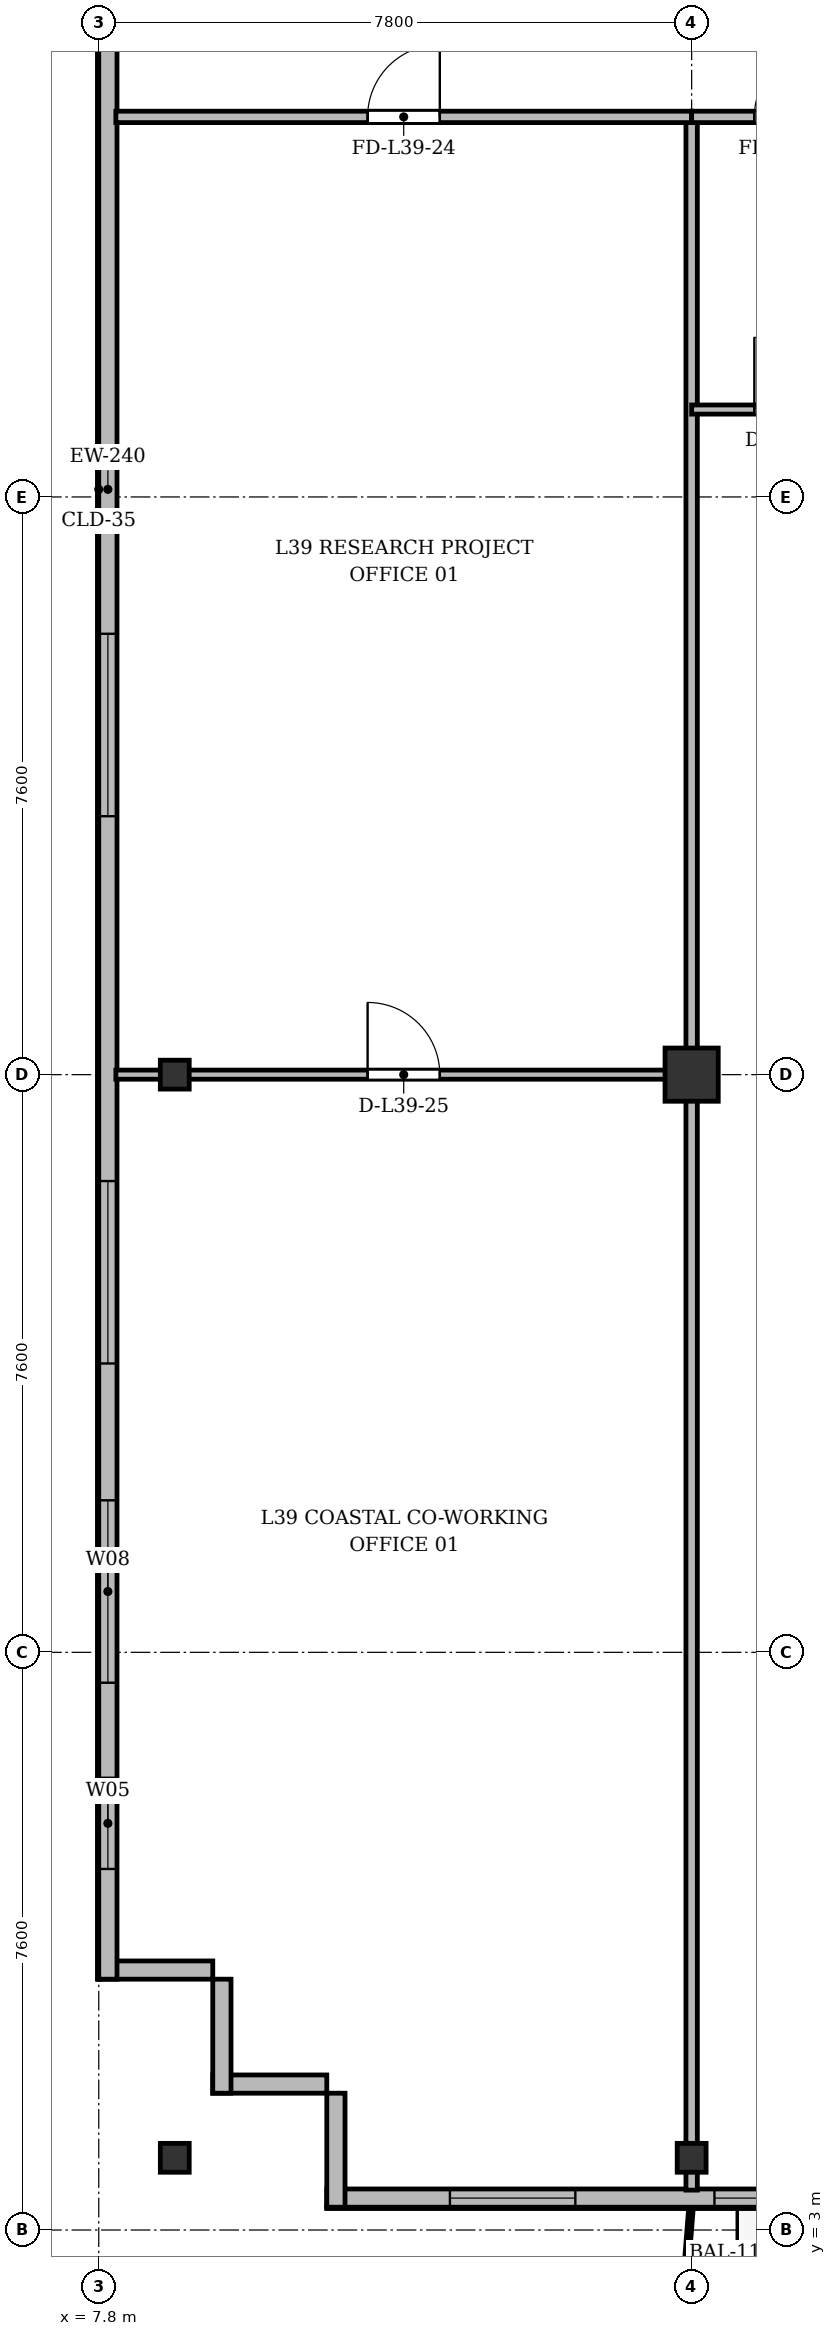
"""IFC4 building model, lengths in metres.
Left out: names, types, materials, properties, quantities, classifications, styles, units other than length and angle.
Written with IfcOpenShell. Run it as: python <this file> out.ifc"""

import sys

from ifc_helpers import new_model, si_unit, direction, frame, frame_2d, origin, origin_2d, place, context, subcontext, project, spatial, rectangle, i_section, extrude, source, transform, mapped, element, fill, save


model = new_model("IFC4")
c1 = context("Model", 3, precision=1e-05, world=origin(), true_north=direction((0.0, 1.0)))
c2 = subcontext(c1, "Body", "Model", "MODEL_VIEW")
j1 = project(units=[si_unit("LENGTHUNIT", "METRE"), si_unit("PLANEANGLEUNIT", "RADIAN")], contexts=[c1])
p1 = place(None, origin())
s1 = spatial("IfcSite", under=j1, at=p1, CompositionType="ELEMENT")
p2 = place(p1, origin())
s2 = spatial("IfcBuilding", under=s1, at=p2, CompositionType="ELEMENT")
p3 = place(p2, frame((0.0, 0.0, 150.1)))
s3 = spatial("IfcBuildingStorey", under=s2, at=p3, CompositionType="ELEMENT", Elevation=150.1)
m1 = source(origin(), c2, "Body", "SweptSolid", [
    extrude(i_section(OverallWidth=0.38, OverallDepth=0.38, WebThickness=0.02, FlangeThickness=0.03, at=origin_2d()), origin(), (0.0, 0.0, 1.0), 3.6),
])
for number, where, z_axis, x_axis in (
    (1, (8.8, 3.95, 0.0), (0.0, 0.0, 1.0), (1.0, 0.0, 0.0)),
    (2, (8.8, 18.2, 0.0), (0.0, 0.0, 1.0), (1.0, 0.0, 0.0)),
    (3, (15.6, 3.95, 0.0), (0.0, 0.0, 1.0), (1.0, 0.0, 0.0)),
):
    element("IfcColumn", number, at=place(p3, frame(where, z_axis=z_axis, x_axis=x_axis)), inside=s3, PredefinedType="COLUMN", context=c2, shape_type="MappedRepresentation", body=[
        mapped(m1, transform((0.0, 0.0, 0.0), x_axis=(1.0, 0.0, 0.0), y_axis=(0.0, 1.0, 0.0), z_axis=(0.0, 0.0, 1.0), scale=1.0)),
    ])
m2 = source(origin(), c2, "Body", "SweptSolid", [
    extrude(rectangle(XDim=0.7, YDim=0.7, at=origin_2d()), origin(), (0.0, 0.0, 1.0), 3.6),
])
p4 = place(p3, frame((15.6, 18.2, 0.0), z_axis=(0.0, 0.0, 1.0), x_axis=(1.0, 0.0, 0.0)))
e4 = element("IfcColumn", 4, at=p4, inside=s3, PredefinedType="COLUMN", context=c2, shape_type="MappedRepresentation", body=[
    mapped(m2, transform((0.0, 0.0, 0.0), x_axis=(1.0, 0.0, 0.0), y_axis=(0.0, 1.0, 0.0), z_axis=(0.0, 0.0, 1.0), scale=1.0)),
])
for number, where, z_axis, x_axis in (
    (5, (10.8, 4.92, 0.0), (0.0, 0.0, 1.0), (-1.0, 0.0, 0.0)),
    (6, (9.42, 4.8, 0.0), (0.0, 0.0, 1.0), (0.0, 1.0, 0.0)),
):
    element("IfcWall", number, at=place(p3, frame(where, z_axis=z_axis, x_axis=x_axis)), inside=s3, PredefinedType="SOLIDWALL", context=c2, shape_type="SweptSolid", body=[
        extrude(rectangle(XDim=1.5, YDim=0.24, at=frame_2d((0.75, 0.0))), origin(), (0.0, 0.0, 1.0), 3.35),
    ])
p5 = place(p3, frame((9.3, 6.42, 0.0), z_axis=(0.0, 0.0, 1.0), x_axis=(-1.0, 0.0, 0.0)))
e7 = element("IfcWall", 7, at=p5, inside=s3, PredefinedType="SOLIDWALL", context=c2, shape_type="SweptSolid", body=[
    extrude(rectangle(XDim=1.5, YDim=0.24, at=frame_2d((0.75, 0.0))), origin(), (0.0, 0.0, 1.0), 2.85),
])
p6 = place(p3, frame((7.92, 6.3, 0.0), z_axis=(0.0, 0.0, 1.0), x_axis=(0.0, 1.0, 0.0)))
e8 = element("IfcWall", 8, at=p6, inside=s3, PredefinedType="SOLIDWALL", context=c2, shape_type="SweptSolid", body=[
    extrude(rectangle(XDim=39.2, YDim=0.24, at=frame_2d((19.6, 0.0))), origin(), (0.0, 0.0, 1.0), 3.35),
])
p7 = place(p6, frame((1.45, 0.0, 0.92)))
e9 = element("IfcOpeningElement", 9, at=p7, cuts=e8, PredefinedType="OPENING", context=c2, shape_type="SweptSolid", body=[
    extrude(rectangle(XDim=1.2, YDim=1.65, at=frame_2d((0.6, 0.825))), frame((0.0, 0.13, 0.0), z_axis=(0.0, -1.0, 0.0), x_axis=(1.0, 0.0, 0.0)), (0.0, 0.0, 1.0), 0.26),
])
p8 = place(p6, frame((3.9, 0.0, 0.92)))
e10 = element("IfcOpeningElement", 10, at=p8, cuts=e8, PredefinedType="OPENING", context=c2, shape_type="SweptSolid", body=[
    extrude(rectangle(XDim=2.4, YDim=2.1, at=frame_2d((1.2, 1.05))), frame((0.0, 0.13, 0.0), z_axis=(0.0, -1.0, 0.0), x_axis=(1.0, 0.0, 0.0)), (0.0, 0.0, 1.0), 0.26),
])
p9 = place(p6, frame((8.1, 0.0, 0.92)))
e11 = element("IfcOpeningElement", 11, at=p9, cuts=e8, PredefinedType="OPENING", context=c2, shape_type="SweptSolid", body=[
    extrude(rectangle(XDim=2.4, YDim=2.1, at=frame_2d((1.2, 1.05))), frame((0.0, 0.13, 0.0), z_axis=(0.0, -1.0, 0.0), x_axis=(1.0, 0.0, 0.0)), (0.0, 0.0, 1.0), 0.26),
])
p10 = place(p6, frame((15.3, 0.0, 0.92)))
e12 = element("IfcOpeningElement", 12, at=p10, cuts=e8, PredefinedType="OPENING", context=c2, shape_type="SweptSolid", body=[
    extrude(rectangle(XDim=2.4, YDim=2.1, at=frame_2d((1.2, 1.05))), frame((0.0, 0.13, 0.0), z_axis=(0.0, -1.0, 0.0), x_axis=(1.0, 0.0, 0.0)), (0.0, 0.0, 1.0), 0.26),
])
p11 = place(p6, frame((29.3, 0.0, 0.92)))
e13 = element("IfcOpeningElement", 13, at=p11, cuts=e8, PredefinedType="OPENING", context=c2, shape_type="SweptSolid", body=[
    extrude(rectangle(XDim=2.4, YDim=2.1, at=frame_2d((1.2, 1.05))), frame((0.0, 0.13, 0.0), z_axis=(0.0, -1.0, 0.0), x_axis=(1.0, 0.0, 0.0)), (0.0, 0.0, 1.0), 0.26),
])
p12 = place(p6, frame((33.5, 0.0, 0.92)))
e14 = element("IfcOpeningElement", 14, at=p12, cuts=e8, PredefinedType="OPENING", context=c2, shape_type="SweptSolid", body=[
    extrude(rectangle(XDim=1.2, YDim=1.65, at=frame_2d((0.6, 0.825))), frame((0.0, 0.13, 0.0), z_axis=(0.0, -1.0, 0.0), x_axis=(1.0, 0.0, 0.0)), (0.0, 0.0, 1.0), 0.26),
])
p13 = place(p6, frame((36.85, 0.0, 0.92)))
e15 = element("IfcOpeningElement", 15, at=p13, cuts=e8, PredefinedType="OPENING", context=c2, shape_type="SweptSolid", body=[
    extrude(rectangle(XDim=1.2, YDim=1.65, at=frame_2d((0.6, 0.825))), frame((0.0, 0.13, 0.0), z_axis=(0.0, -1.0, 0.0), x_axis=(1.0, 0.0, 0.0)), (0.0, 0.0, 1.0), 0.26),
])
p14 = place(p3, frame((63.6, 3.42, 0.0), z_axis=(0.0, 0.0, 1.0), x_axis=(-1.0, 0.0, 0.0)))
e16 = element("IfcWall", 16, at=p14, inside=s3, PredefinedType="SOLIDWALL", context=c2, shape_type="SweptSolid", body=[
    extrude(rectangle(XDim=52.8, YDim=0.24, at=frame_2d((26.4, 0.0))), origin(), (0.0, 0.0, 1.0), 3.35),
])
p15 = place(p14, frame((1.62, 0.0, 0.9)))
e17 = element("IfcOpeningElement", 17, at=p15, cuts=e16, PredefinedType="OPENING", context=c2, shape_type="SweptSolid", body=[
    extrude(rectangle(XDim=1.65, YDim=1.85, at=frame_2d((0.825, 0.925))), frame((0.0, 0.13, 0.0), z_axis=(0.0, -1.0, 0.0), x_axis=(1.0, 0.0, 0.0)), (0.0, 0.0, 1.0), 0.26),
])
p16 = place(p14, frame((5.2, 0.0, 0.9)))
e18 = element("IfcOpeningElement", 18, at=p16, cuts=e16, PredefinedType="OPENING", context=c2, shape_type="SweptSolid", body=[
    extrude(rectangle(XDim=1.8, YDim=1.8, at=frame_2d((0.9, 0.9))), frame((0.0, 0.13, 0.0), z_axis=(0.0, -1.0, 0.0), x_axis=(1.0, 0.0, 0.0)), (0.0, 0.0, 1.0), 0.26),
])
p17 = place(p14, frame((7.65, 0.0, 0.9)))
e19 = element("IfcOpeningElement", 19, at=p17, cuts=e16, PredefinedType="OPENING", context=c2, shape_type="SweptSolid", body=[
    extrude(rectangle(XDim=1.5, YDim=1.75, at=frame_2d((0.75, 0.875))), frame((0.0, 0.13, 0.0), z_axis=(0.0, -1.0, 0.0), x_axis=(1.0, 0.0, 0.0)), (0.0, 0.0, 1.0), 0.26),
])
p18 = place(p14, frame((10.25, 0.0, 0.9)))
e20 = element("IfcOpeningElement", 20, at=p18, cuts=e16, PredefinedType="OPENING", context=c2, shape_type="SweptSolid", body=[
    extrude(rectangle(XDim=1.5, YDim=1.75, at=frame_2d((0.75, 0.875))), frame((0.0, 0.13, 0.0), z_axis=(0.0, -1.0, 0.0), x_axis=(1.0, 0.0, 0.0)), (0.0, 0.0, 1.0), 0.26),
])
p19 = place(p14, frame((14.417, 0.0, 0.0)))
e21 = element("IfcOpeningElement", 21, at=p19, cuts=e16, PredefinedType="OPENING", context=c2, shape_type="SweptSolid", body=[
    extrude(rectangle(XDim=1.2, YDim=2.2, at=frame_2d((0.6, 1.1))), frame((0.0, 0.13, 0.0), z_axis=(0.0, -1.0, 0.0), x_axis=(1.0, 0.0, 0.0)), (0.0, 0.0, 1.0), 0.26),
])
p20 = place(p14, frame((25.575, 0.0, 0.9)))
e22 = element("IfcOpeningElement", 22, at=p20, cuts=e16, PredefinedType="OPENING", context=c2, shape_type="SweptSolid", body=[
    extrude(rectangle(XDim=1.65, YDim=1.85, at=frame_2d((0.825, 0.925))), frame((0.0, 0.13, 0.0), z_axis=(0.0, -1.0, 0.0), x_axis=(1.0, 0.0, 0.0)), (0.0, 0.0, 1.0), 0.26),
])
p21 = place(p14, frame((35.7, 0.0, 0.9)))
e23 = element("IfcOpeningElement", 23, at=p21, cuts=e16, PredefinedType="OPENING", context=c2, shape_type="SweptSolid", body=[
    extrude(rectangle(XDim=1.8, YDim=1.8, at=frame_2d((0.9, 0.9))), frame((0.0, 0.13, 0.0), z_axis=(0.0, -1.0, 0.0), x_axis=(1.0, 0.0, 0.0)), (0.0, 0.0, 1.0), 0.26),
])
p22 = place(p14, frame((41.656, 0.0, 0.0)))
e24 = element("IfcOpeningElement", 24, at=p22, cuts=e16, PredefinedType="OPENING", context=c2, shape_type="SweptSolid", body=[
    extrude(rectangle(XDim=1.2, YDim=2.2, at=frame_2d((0.6, 1.1))), frame((0.0, 0.13, 0.0), z_axis=(0.0, -1.0, 0.0), x_axis=(1.0, 0.0, 0.0)), (0.0, 0.0, 1.0), 0.26),
])
p23 = place(p14, frame((43.65, 0.0, 0.9)))
e25 = element("IfcOpeningElement", 25, at=p23, cuts=e16, PredefinedType="OPENING", context=c2, shape_type="SweptSolid", body=[
    extrude(rectangle(XDim=1.5, YDim=1.75, at=frame_2d((0.75, 0.875))), frame((0.0, 0.13, 0.0), z_axis=(0.0, -1.0, 0.0), x_axis=(1.0, 0.0, 0.0)), (0.0, 0.0, 1.0), 0.26),
])
p24 = place(p14, frame((45.7, 0.0, 0.9)))
e26 = element("IfcOpeningElement", 26, at=p24, cuts=e16, PredefinedType="OPENING", context=c2, shape_type="SweptSolid", body=[
    extrude(rectangle(XDim=2.0, YDim=1.95, at=frame_2d((1.0, 0.975))), frame((0.0, 0.13, 0.0), z_axis=(0.0, -1.0, 0.0), x_axis=(1.0, 0.0, 0.0)), (0.0, 0.0, 1.0), 0.26),
])
p25 = place(p14, frame((49.53, 0.0, 0.9)))
e27 = element("IfcOpeningElement", 27, at=p25, cuts=e16, PredefinedType="OPENING", context=c2, shape_type="SweptSolid", body=[
    extrude(rectangle(XDim=1.65, YDim=1.85, at=frame_2d((0.825, 0.925))), frame((0.0, 0.13, 0.0), z_axis=(0.0, -1.0, 0.0), x_axis=(1.0, 0.0, 0.0)), (0.0, 0.0, 1.0), 0.26),
])
p26 = place(p3, frame((10.92, 3.3, 0.0), z_axis=(0.0, 0.0, 1.0), x_axis=(0.0, 1.0, 0.0)))
e28 = element("IfcWall", 28, at=p26, inside=s3, PredefinedType="SOLIDWALL", context=c2, shape_type="SweptSolid", body=[
    extrude(rectangle(XDim=1.5, YDim=0.24, at=frame_2d((0.75, 0.0))), origin(), (0.0, 0.0, 1.0), 2.75),
])
p27 = place(p3, frame((15.6, 3.525, 0.0), z_axis=(0.0, 0.0, 1.0), x_axis=(0.0, 1.0, 0.0)))
e29 = element("IfcWall", 29, at=p27, inside=s3, PredefinedType="PARTITIONING", context=c2, shape_type="SweptSolid", body=[
    extrude(rectangle(XDim=27.275, YDim=0.15, at=frame_2d((13.638, 0.0))), origin(), (0.0, 0.0, 1.0), 2.85),
])
p28 = place(p3, frame((8.025, 30.8, 0.0), z_axis=(0.0, 0.0, 1.0), x_axis=(1.0, 0.0, 0.0)))
e30 = element("IfcWall", 30, at=p28, inside=s3, PredefinedType="PARTITIONING", context=c2, shape_type="SweptSolid", body=[
    extrude(rectangle(XDim=7.575, YDim=0.15, at=frame_2d((3.788, 0.0))), origin(), (0.0, 0.0, 1.0), 2.85),
])
p29 = place(p28, frame((3.312, 0.0, 0.0)))
e31 = element("IfcOpeningElement", 31, at=p29, cuts=e30, PredefinedType="OPENING", context=c2, shape_type="SweptSolid", body=[
    extrude(rectangle(XDim=0.95, YDim=2.15, at=frame_2d((0.475, 1.075))), frame((0.0, 0.085, 0.0), z_axis=(0.0, -1.0, 0.0), x_axis=(1.0, 0.0, 0.0)), (0.0, 0.0, 1.0), 0.17),
])
p30 = place(p3, frame((8.025, 18.2, 0.0), z_axis=(0.0, 0.0, 1.0), x_axis=(1.0, 0.0, 0.0)))
e32 = element("IfcWall", 32, at=p30, inside=s3, PredefinedType="PARTITIONING", context=c2, shape_type="SweptSolid", body=[
    extrude(rectangle(XDim=7.575, YDim=0.12, at=frame_2d((3.788, 0.0))), origin(), (0.0, 0.0, 1.0), 2.75),
])
p31 = place(p30, frame((3.312, 0.0, 0.0)))
e33 = element("IfcOpeningElement", 33, at=p31, cuts=e32, PredefinedType="OPENING", context=c2, shape_type="SweptSolid", body=[
    extrude(rectangle(XDim=0.95, YDim=2.15, at=frame_2d((0.475, 1.075))), frame((0.0, 0.07, 0.0), z_axis=(0.0, -1.0, 0.0), x_axis=(1.0, 0.0, 0.0)), (0.0, 0.0, 1.0), 0.14),
])
p32 = place(p3, frame((15.6, 30.8, 0.0), z_axis=(0.0, 0.0, 1.0), x_axis=(1.0, 0.0, 0.0)))
e34 = element("IfcWall", 34, at=p32, inside=s3, PredefinedType="PARTITIONING", context=c2, shape_type="SweptSolid", body=[
    extrude(rectangle(XDim=2.6, YDim=0.15, at=frame_2d((1.3, 0.0))), origin(), (0.0, 0.0, 1.0), 2.85),
])
p33 = place(p32, frame((0.825, 0.0, 0.0)))
e35 = element("IfcOpeningElement", 35, at=p33, cuts=e34, PredefinedType="OPENING", context=c2, shape_type="SweptSolid", body=[
    extrude(rectangle(XDim=0.95, YDim=2.15, at=frame_2d((0.475, 1.075))), frame((0.0, 0.085, 0.0), z_axis=(0.0, -1.0, 0.0), x_axis=(1.0, 0.0, 0.0)), (0.0, 0.0, 1.0), 0.17),
])
p34 = place(p3, frame((15.6, 26.95, 0.0), z_axis=(0.0, 0.0, 1.0), x_axis=(1.0, 0.0, 0.0)))
e36 = element("IfcWall", 36, at=p34, inside=s3, PredefinedType="PARTITIONING", context=c2, shape_type="SweptSolid", body=[
    extrude(rectangle(XDim=2.6, YDim=0.12, at=frame_2d((1.3, 0.0))), origin(), (0.0, 0.0, 1.0), 2.85),
])
p35 = place(p34, frame((0.825, 0.0, 0.0)))
e37 = element("IfcOpeningElement", 37, at=p35, cuts=e36, PredefinedType="OPENING", context=c2, shape_type="SweptSolid", body=[
    extrude(rectangle(XDim=0.95, YDim=2.15, at=frame_2d((0.475, 1.075))), frame((0.0, 0.07, 0.0), z_axis=(0.0, -1.0, 0.0), x_axis=(1.0, 0.0, 0.0)), (0.0, 0.0, 1.0), 0.14),
])
m3 = source(origin(), c2, "Body", "SweptSolid", [
    extrude(rectangle(XDim=1.2, YDim=1.65, at=frame_2d((0.6, 0.825))), frame((0.0, 0.03, 0.0), z_axis=(0.0, -1.0, 0.0), x_axis=(1.0, 0.0, 0.0)), (0.0, 0.0, 1.0), 0.06),
])
p36 = place(p7, origin())
e38 = element("IfcWindow", 38, at=p36, inside=s3, PartitioningType="SINGLE_PANEL", PredefinedType="WINDOW", context=c2, shape_type="MappedRepresentation", body=[
    mapped(m3, transform((0.0, 0.0, 0.0), x_axis=(1.0, 0.0, 0.0), y_axis=(0.0, 1.0, 0.0), z_axis=(0.0, 0.0, 1.0), scale=1.0)),
])
fill(e9, e38)
m4 = source(origin(), c2, "Body", "SweptSolid", [
    extrude(rectangle(XDim=2.4, YDim=2.1, at=frame_2d((1.2, 1.05))), frame((0.0, 0.03, 0.0), z_axis=(0.0, -1.0, 0.0), x_axis=(1.0, 0.0, 0.0)), (0.0, 0.0, 1.0), 0.06),
])
p37 = place(p8, origin())
e39 = element("IfcWindow", 39, at=p37, inside=s3, PartitioningType="SINGLE_PANEL", PredefinedType="WINDOW", context=c2, shape_type="MappedRepresentation", body=[
    mapped(m4, transform((0.0, 0.0, 0.0), x_axis=(1.0, 0.0, 0.0), y_axis=(0.0, 1.0, 0.0), z_axis=(0.0, 0.0, 1.0), scale=1.0)),
])
fill(e10, e39)
p38 = place(p9, origin())
e40 = element("IfcWindow", 40, at=p38, inside=s3, PartitioningType="SINGLE_PANEL", PredefinedType="WINDOW", context=c2, shape_type="MappedRepresentation", body=[
    mapped(m4, transform((0.0, 0.0, 0.0), x_axis=(1.0, 0.0, 0.0), y_axis=(0.0, 1.0, 0.0), z_axis=(0.0, 0.0, 1.0), scale=1.0)),
])
fill(e11, e40)
p39 = place(p10, origin())
e41 = element("IfcWindow", 41, at=p39, inside=s3, PartitioningType="SINGLE_PANEL", PredefinedType="WINDOW", context=c2, shape_type="MappedRepresentation", body=[
    mapped(m4, transform((0.0, 0.0, 0.0), x_axis=(1.0, 0.0, 0.0), y_axis=(0.0, 1.0, 0.0), z_axis=(0.0, 0.0, 1.0), scale=1.0)),
])
fill(e12, e41)
m5 = source(origin(), c2, "Body", "SweptSolid", [
    extrude(rectangle(XDim=2.0, YDim=1.95, at=frame_2d((1.0, 0.975))), frame((0.0, 0.03, 0.0), z_axis=(0.0, -1.0, 0.0), x_axis=(1.0, 0.0, 0.0)), (0.0, 0.0, 1.0), 0.06),
])
p40 = place(p24, origin())
e42 = element("IfcWindow", 42, at=p40, inside=s3, PartitioningType="SINGLE_PANEL", PredefinedType="WINDOW", context=c2, shape_type="MappedRepresentation", body=[
    mapped(m5, transform((0.0, 0.0, 0.0), x_axis=(1.0, 0.0, 0.0), y_axis=(0.0, 1.0, 0.0), z_axis=(0.0, 0.0, 1.0), scale=1.0)),
])
fill(e26, e42)
m6 = source(origin(), c2, "Body", "SweptSolid", [
    extrude(rectangle(XDim=1.65, YDim=1.85, at=frame_2d((0.825, 0.925))), frame((0.0, 0.03, 0.0), z_axis=(0.0, -1.0, 0.0), x_axis=(1.0, 0.0, 0.0)), (0.0, 0.0, 1.0), 0.06),
])
p41 = place(p25, origin())
e43 = element("IfcWindow", 43, at=p41, inside=s3, PartitioningType="SINGLE_PANEL", PredefinedType="WINDOW", context=c2, shape_type="MappedRepresentation", body=[
    mapped(m6, transform((0.0, 0.0, 0.0), x_axis=(1.0, 0.0, 0.0), y_axis=(0.0, 1.0, 0.0), z_axis=(0.0, 0.0, 1.0), scale=1.0)),
])
fill(e27, e43)
m7 = source(origin(), c2, "Body", "SweptSolid", [
    extrude(rectangle(XDim=0.95, YDim=2.15, at=frame_2d((0.475, 1.075))), frame((0.0, 0.025, 0.0), z_axis=(0.0, -1.0, 0.0), x_axis=(1.0, 0.0, 0.0)), (0.0, 0.0, 1.0), 0.05),
])
p42 = place(p29, origin())
e44 = element("IfcDoor", 44, at=p42, inside=s3, OperationType="SINGLE_SWING_RIGHT", PredefinedType="DOOR", context=c2, shape_type="MappedRepresentation", body=[
    mapped(m7, transform((0.0, 0.0, 0.0), x_axis=(1.0, 0.0, 0.0), y_axis=(0.0, 1.0, 0.0), z_axis=(0.0, 0.0, 1.0), scale=1.0)),
])
fill(e31, e44)
p43 = place(p31, origin())
e45 = element("IfcDoor", 45, at=p43, inside=s3, OperationType="SINGLE_SWING_LEFT", PredefinedType="DOOR", context=c2, shape_type="MappedRepresentation", body=[
    mapped(m7, transform((0.0, 0.0, 0.0), x_axis=(1.0, 0.0, 0.0), y_axis=(0.0, 1.0, 0.0), z_axis=(0.0, 0.0, 1.0), scale=1.0)),
])
fill(e33, e45)
p44 = place(p33, origin())
e46 = element("IfcDoor", 46, at=p44, inside=s3, OperationType="SINGLE_SWING_RIGHT", PredefinedType="DOOR", context=c2, shape_type="MappedRepresentation", body=[
    mapped(m7, transform((0.0, 0.0, 0.0), x_axis=(1.0, 0.0, 0.0), y_axis=(0.0, 1.0, 0.0), z_axis=(0.0, 0.0, 1.0), scale=1.0)),
])
fill(e35, e46)
p45 = place(p35, origin())
e47 = element("IfcDoor", 47, at=p45, inside=s3, OperationType="SINGLE_SWING_LEFT", PredefinedType="DOOR", context=c2, shape_type="MappedRepresentation", body=[
    mapped(m7, transform((0.0, 0.0, 0.0), x_axis=(1.0, 0.0, 0.0), y_axis=(0.0, 1.0, 0.0), z_axis=(0.0, 0.0, 1.0), scale=1.0)),
])
fill(e37, e47)
save(model, sys.argv[1])
